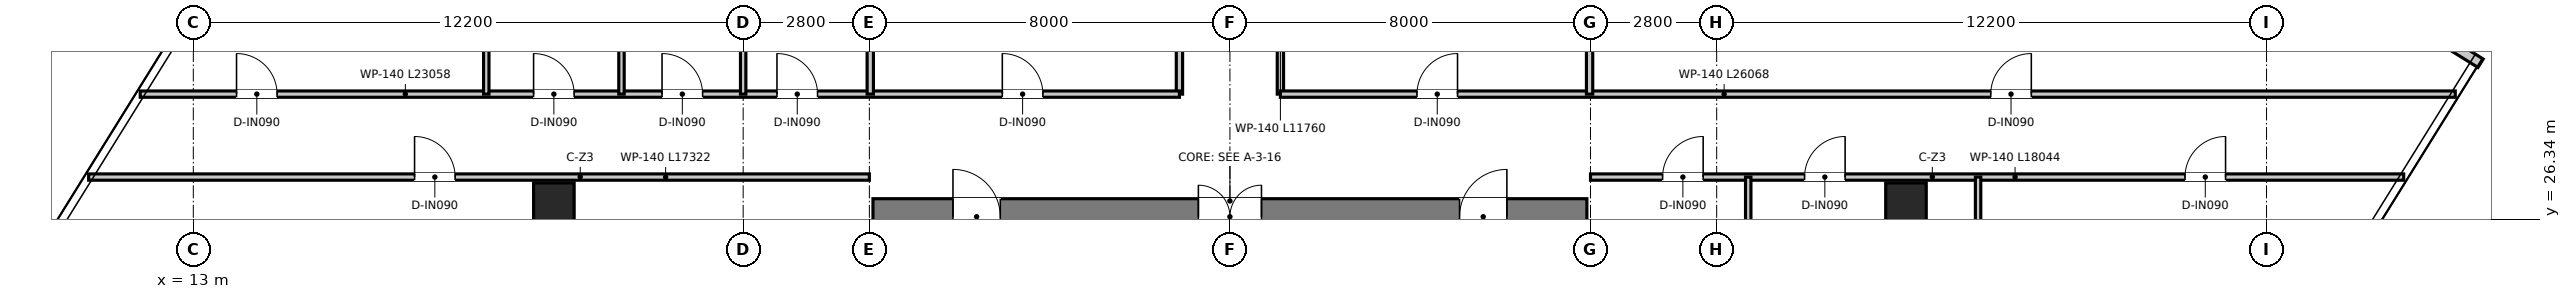
"""IFC4 building model, lengths in metres.
Left out: names, types, materials, properties, quantities, classifications, styles, units other than length and angle.
Written with IfcOpenShell. Run it as: python <this file> out.ifc"""

import sys

from ifc_helpers import new_model, si_unit, direction, frame, frame_2d, origin, origin_2d, place, context, subcontext, project, spatial, rectangle, extrude, source, transform, mapped, element, fill, save


model = new_model("IFC4")
c1 = context("Model", 3, precision=1e-05, world=origin(), true_north=direction((0.0, 1.0)))
c2 = subcontext(c1, "Body", "Model", "MODEL_VIEW")
j1 = project(units=[si_unit("LENGTHUNIT", "METRE"), si_unit("PLANEANGLEUNIT", "RADIAN")], contexts=[c1])
p1 = place(None, origin())
s1 = spatial("IfcSite", under=j1, at=p1, CompositionType="ELEMENT")
p2 = place(p1, origin())
s2 = spatial("IfcBuilding", under=s1, at=p2, CompositionType="ELEMENT")
p3 = place(p2, frame((0.0, 0.0, 173.85)))
s3 = spatial("IfcBuildingStorey", under=s2, at=p3, CompositionType="ELEMENT", Elevation=173.85)
p4 = place(p3, frame((28.08, 26.4, 0.0), z_axis=(0.0, 0.0, 1.0), x_axis=(1.0, 0.0, 0.0)))
e1 = element("IfcWall", 1, at=p4, inside=s3, PredefinedType="SHEAR", context=c2, shape_type="SweptSolid", body=[
    extrude(rectangle(XDim=15.84, YDim=0.8, at=frame_2d((7.92, 0.0))), origin(), (0.0, 0.0, 1.0), 3.95),
])
p5 = place(p4, frame((7.22, 0.0, 0.0)))
e2 = element("IfcOpeningElement", 2, at=p5, cuts=e1, PredefinedType="OPENING", context=c2, shape_type="SweptSolid", body=[
    extrude(rectangle(XDim=1.4, YDim=2.2, at=frame_2d((0.7, 1.1))), frame((0.0, 0.41, 0.0), z_axis=(0.0, -1.0, 0.0), x_axis=(1.0, 0.0, 0.0)), (0.0, 0.0, 1.0), 0.82),
])
p6 = place(p4, frame((1.775, 0.0, 0.0)))
e3 = element("IfcOpeningElement", 3, at=p6, cuts=e1, PredefinedType="OPENING", context=c2, shape_type="SweptSolid", body=[
    extrude(rectangle(XDim=1.05, YDim=2.1, at=frame_2d((0.525, 1.05))), frame((0.0, 0.41, 0.0), z_axis=(0.0, -1.0, 0.0), x_axis=(1.0, 0.0, 0.0)), (0.0, 0.0, 1.0), 0.82),
])
p7 = place(p4, frame((13.015, 0.0, 0.0)))
e4 = element("IfcOpeningElement", 4, at=p7, cuts=e1, PredefinedType="OPENING", context=c2, shape_type="SweptSolid", body=[
    extrude(rectangle(XDim=1.05, YDim=2.1, at=frame_2d((0.525, 1.05))), frame((0.0, 0.41, 0.0), z_axis=(0.0, -1.0, 0.0), x_axis=(1.0, 0.0, 0.0)), (0.0, 0.0, 1.0), 0.82),
])
m1 = source(origin(), c2, "Body", "SweptSolid", [
    extrude(rectangle(XDim=0.9, YDim=0.9, at=origin_2d()), origin(), (0.0, 0.0, 1.0), 3.95),
])
for number, where, z_axis, x_axis in (
    (5, (21.0, 26.7, 0.0), (0.0, 0.0, 1.0), (1.0, 0.0, 0.0)),
    (6, (51.0, 26.7, 0.0), (0.0, 0.0, 1.0), (1.0, 0.0, 0.0)),
):
    element("IfcColumn", number, at=place(p3, frame(where, z_axis=z_axis, x_axis=x_axis)), inside=s3, PredefinedType="COLUMN", context=c2, shape_type="MappedRepresentation", body=[
        mapped(m1, transform((0.0, 0.0, 0.0), x_axis=(1.0, 0.0, 0.0), y_axis=(0.0, 1.0, 0.0), z_axis=(0.0, 0.0, 1.0), scale=1.0)),
    ])
p8 = place(p3, frame((63.749, 29.805, 0.0), z_axis=(0.0, 0.0, 1.0), x_axis=(-0.84921299194, 0.528050465694, 0.0)))
e7 = element("IfcWall", 7, at=p8, inside=s3, PredefinedType="ELEMENTEDWALL", context=c2, shape_type="SweptSolid", body=[
    extrude(rectangle(XDim=4.745, YDim=0.22, at=frame_2d((2.373, 0.0))), origin(), (0.0, 0.0, 1.0), 3.67),
])
p9 = place(p3, frame((34.88, 29.12, 0.0), z_axis=(0.0, 0.0, 1.0), x_axis=(0.0, 1.0, 0.0)))
e8 = element("IfcWall", 8, at=p9, inside=s3, PredefinedType="PARTITIONING", context=c2, shape_type="SweptSolid", body=[
    extrude(rectangle(XDim=11.76, YDim=0.14, at=frame_2d((5.88, 0.0))), origin(), (0.0, 0.0, 1.0), 3.03),
])
p10 = place(p9, frame((3.205, 0.0, 0.0)))
e9 = element("IfcOpeningElement", 9, at=p10, cuts=e8, PredefinedType="OPENING", context=c2, shape_type="SweptSolid", body=[
    extrude(rectangle(XDim=0.95, YDim=2.1, at=frame_2d((0.475, 1.05))), frame((0.0, 0.08, 0.0), z_axis=(0.0, -1.0, 0.0), x_axis=(1.0, 0.0, 0.0)), (0.0, 0.0, 1.0), 0.16),
])
p11 = place(p9, frame((8.02, 0.0, 0.0)))
e10 = element("IfcOpeningElement", 10, at=p11, cuts=e8, PredefinedType="OPENING", context=c2, shape_type="SweptSolid", body=[
    extrude(rectangle(XDim=0.9, YDim=2.1, at=frame_2d((0.45, 1.05))), frame((0.0, 0.08, 0.0), z_axis=(0.0, -1.0, 0.0), x_axis=(1.0, 0.0, 0.0)), (0.0, 0.0, 1.0), 0.16),
])
p12 = place(p3, frame((37.12, 29.12, 0.0), z_axis=(0.0, 0.0, 1.0), x_axis=(0.0, 1.0, 0.0)))
e11 = element("IfcWall", 11, at=p12, inside=s3, PredefinedType="PARTITIONING", context=c2, shape_type="SweptSolid", body=[
    extrude(rectangle(XDim=11.76, YDim=0.14, at=frame_2d((5.88, 0.0))), origin(), (0.0, 0.0, 1.0), 3.03),
])
p13 = place(p12, frame((4.085, 0.0, 0.0)))
e12 = element("IfcOpeningElement", 12, at=p13, cuts=e11, PredefinedType="OPENING", context=c2, shape_type="SweptSolid", body=[
    extrude(rectangle(XDim=0.95, YDim=2.1, at=frame_2d((0.475, 1.05))), frame((0.0, 0.08, 0.0), z_axis=(0.0, -1.0, 0.0), x_axis=(1.0, 0.0, 0.0)), (0.0, 0.0, 1.0), 0.16),
])
p14 = place(p12, frame((6.82, 0.0, 0.0)))
e13 = element("IfcOpeningElement", 13, at=p14, cuts=e11, PredefinedType="OPENING", context=c2, shape_type="SweptSolid", body=[
    extrude(rectangle(XDim=0.9, YDim=2.1, at=frame_2d((0.45, 1.05))), frame((0.0, 0.08, 0.0), z_axis=(0.0, -1.0, 0.0), x_axis=(1.0, 0.0, 0.0)), (0.0, 0.0, 1.0), 0.16),
])
p15 = place(p12, frame((9.83, 0.0, 0.0)))
e14 = element("IfcOpeningElement", 14, at=p15, cuts=e11, PredefinedType="OPENING", context=c2, shape_type="SweptSolid", body=[
    extrude(rectangle(XDim=0.9, YDim=2.1, at=frame_2d((0.45, 1.05))), frame((0.0, 0.08, 0.0), z_axis=(0.0, -1.0, 0.0), x_axis=(1.0, 0.0, 0.0)), (0.0, 0.0, 1.0), 0.16),
])
p16 = place(p3, frame((11.822, 29.12, 0.0), z_axis=(0.0, 0.0, 1.0), x_axis=(1.0, 0.0, 0.0)))
e15 = element("IfcWall", 15, at=p16, inside=s3, PredefinedType="PARTITIONING", context=c2, shape_type="SweptSolid", body=[
    extrude(rectangle(XDim=23.058, YDim=0.14, at=frame_2d((11.529, 0.0))), origin(), (0.0, 0.0, 1.0), 3.03),
])
p17 = place(p16, frame((19.128, 0.0, 0.0)))
e16 = element("IfcOpeningElement", 16, at=p17, cuts=e15, PredefinedType="OPENING", context=c2, shape_type="SweptSolid", body=[
    extrude(rectangle(XDim=0.9, YDim=2.1, at=frame_2d((0.45, 1.05))), frame((0.0, 0.08, 0.0), z_axis=(0.0, -1.0, 0.0), x_axis=(1.0, 0.0, 0.0)), (0.0, 0.0, 1.0), 0.16),
])
p18 = place(p16, frame((2.137, 0.0, 0.0)))
e17 = element("IfcOpeningElement", 17, at=p18, cuts=e15, PredefinedType="OPENING", context=c2, shape_type="SweptSolid", body=[
    extrude(rectangle(XDim=0.9, YDim=2.1, at=frame_2d((0.45, 1.05))), frame((0.0, 0.08, 0.0), z_axis=(0.0, -1.0, 0.0), x_axis=(1.0, 0.0, 0.0)), (0.0, 0.0, 1.0), 0.16),
])
p19 = place(p16, frame((8.728, 0.0, 0.0)))
e18 = element("IfcOpeningElement", 18, at=p19, cuts=e15, PredefinedType="OPENING", context=c2, shape_type="SweptSolid", body=[
    extrude(rectangle(XDim=0.9, YDim=2.1, at=frame_2d((0.45, 1.05))), frame((0.0, 0.08, 0.0), z_axis=(0.0, -1.0, 0.0), x_axis=(1.0, 0.0, 0.0)), (0.0, 0.0, 1.0), 0.16),
])
p20 = place(p16, frame((11.578, 0.0, 0.0)))
e19 = element("IfcOpeningElement", 19, at=p20, cuts=e15, PredefinedType="OPENING", context=c2, shape_type="SweptSolid", body=[
    extrude(rectangle(XDim=0.9, YDim=2.1, at=frame_2d((0.45, 1.05))), frame((0.0, 0.08, 0.0), z_axis=(0.0, -1.0, 0.0), x_axis=(1.0, 0.0, 0.0)), (0.0, 0.0, 1.0), 0.16),
])
p21 = place(p16, frame((14.128, 0.0, 0.0)))
e20 = element("IfcOpeningElement", 20, at=p21, cuts=e15, PredefinedType="OPENING", context=c2, shape_type="SweptSolid", body=[
    extrude(rectangle(XDim=0.9, YDim=2.1, at=frame_2d((0.45, 1.05))), frame((0.0, 0.08, 0.0), z_axis=(0.0, -1.0, 0.0), x_axis=(1.0, 0.0, 0.0)), (0.0, 0.0, 1.0), 0.16),
])
p22 = place(p3, frame((37.12, 29.12, 0.0), z_axis=(0.0, 0.0, 1.0), x_axis=(1.0, 0.0, 0.0)))
e21 = element("IfcWall", 21, at=p22, inside=s3, PredefinedType="PARTITIONING", context=c2, shape_type="SweptSolid", body=[
    extrude(rectangle(XDim=26.068, YDim=0.14, at=frame_2d((13.034, 0.0))), origin(), (0.0, 0.0, 1.0), 3.03),
])
p23 = place(p22, frame((3.03, 0.0, 0.0)))
e22 = element("IfcOpeningElement", 22, at=p23, cuts=e21, PredefinedType="OPENING", context=c2, shape_type="SweptSolid", body=[
    extrude(rectangle(XDim=0.9, YDim=2.1, at=frame_2d((0.45, 1.05))), frame((0.0, 0.08, 0.0), z_axis=(0.0, -1.0, 0.0), x_axis=(1.0, 0.0, 0.0)), (0.0, 0.0, 1.0), 0.16),
])
p24 = place(p22, frame((15.761, 0.0, 0.0)))
e23 = element("IfcOpeningElement", 23, at=p24, cuts=e21, PredefinedType="OPENING", context=c2, shape_type="SweptSolid", body=[
    extrude(rectangle(XDim=0.9, YDim=2.1, at=frame_2d((0.45, 1.05))), frame((0.0, 0.08, 0.0), z_axis=(0.0, -1.0, 0.0), x_axis=(1.0, 0.0, 0.0)), (0.0, 0.0, 1.0), 0.16),
])
p25 = place(p3, frame((10.678, 27.28, 0.0), z_axis=(0.0, 0.0, 1.0), x_axis=(1.0, 0.0, 0.0)))
e24 = element("IfcWall", 24, at=p25, inside=s3, PredefinedType="PARTITIONING", context=c2, shape_type="SweptSolid", body=[
    extrude(rectangle(XDim=17.322, YDim=0.14, at=frame_2d((8.661, 0.0))), origin(), (0.0, 0.0, 1.0), 3.03),
])
p26 = place(p25, frame((7.231, 0.0, 0.0)))
e25 = element("IfcOpeningElement", 25, at=p26, cuts=e24, PredefinedType="OPENING", context=c2, shape_type="SweptSolid", body=[
    extrude(rectangle(XDim=0.9, YDim=2.1, at=frame_2d((0.45, 1.05))), frame((0.0, 0.08, 0.0), z_axis=(0.0, -1.0, 0.0), x_axis=(1.0, 0.0, 0.0)), (0.0, 0.0, 1.0), 0.16),
])
p27 = place(p3, frame((44.0, 27.28, 0.0), z_axis=(0.0, 0.0, 1.0), x_axis=(1.0, 0.0, 0.0)))
e26 = element("IfcWall", 26, at=p27, inside=s3, PredefinedType="PARTITIONING", context=c2, shape_type="SweptSolid", body=[
    extrude(rectangle(XDim=18.044, YDim=0.14, at=frame_2d((9.022, 0.0))), origin(), (0.0, 0.0, 1.0), 3.03),
])
p28 = place(p27, frame((1.6, 0.0, 0.0)))
e27 = element("IfcOpeningElement", 27, at=p28, cuts=e26, PredefinedType="OPENING", context=c2, shape_type="SweptSolid", body=[
    extrude(rectangle(XDim=0.9, YDim=2.1, at=frame_2d((0.45, 1.05))), frame((0.0, 0.08, 0.0), z_axis=(0.0, -1.0, 0.0), x_axis=(1.0, 0.0, 0.0)), (0.0, 0.0, 1.0), 0.16),
])
p29 = place(p27, frame((4.75, 0.0, 0.0)))
e28 = element("IfcOpeningElement", 28, at=p29, cuts=e26, PredefinedType="OPENING", context=c2, shape_type="SweptSolid", body=[
    extrude(rectangle(XDim=0.9, YDim=2.1, at=frame_2d((0.45, 1.05))), frame((0.0, 0.08, 0.0), z_axis=(0.0, -1.0, 0.0), x_axis=(1.0, 0.0, 0.0)), (0.0, 0.0, 1.0), 0.16),
])
p30 = place(p27, frame((13.191, 0.0, 0.0)))
e29 = element("IfcOpeningElement", 29, at=p30, cuts=e26, PredefinedType="OPENING", context=c2, shape_type="SweptSolid", body=[
    extrude(rectangle(XDim=0.9, YDim=2.1, at=frame_2d((0.45, 1.05))), frame((0.0, 0.08, 0.0), z_axis=(0.0, -1.0, 0.0), x_axis=(1.0, 0.0, 0.0)), (0.0, 0.0, 1.0), 0.16),
])
for number, where, z_axis, x_axis in (
    (30, (28.02, 29.12, 0.0), (0.0, 0.0, 1.0), (0.0, 1.0, 0.0)),
    (31, (43.98, 29.12, 0.0), (0.0, 0.0, 1.0), (0.0, 1.0, 0.0)),
):
    element("IfcWall", number, at=place(p3, frame(where, z_axis=z_axis, x_axis=x_axis)), inside=s3, PredefinedType="PARTITIONING", context=c2, shape_type="SweptSolid", body=[
        extrude(rectangle(XDim=5.46, YDim=0.14, at=frame_2d((2.73, 0.0))), origin(), (0.0, 0.0, 1.0), 3.31),
    ])
p31 = place(p3, frame((19.5, 29.12, 0.0), z_axis=(0.0, 0.0, 1.0), x_axis=(0.0, 1.0, 0.0)))
e32 = element("IfcWall", 32, at=p31, inside=s3, PredefinedType="PARTITIONING", context=c2, shape_type="SweptSolid", body=[
    extrude(rectangle(XDim=12.347, YDim=0.12, at=frame_2d((6.174, 0.0))), origin(), (0.0, 0.0, 1.0), 3.67),
])
p32 = place(p3, frame((22.5, 29.12, 0.0), z_axis=(0.0, 0.0, 1.0), x_axis=(0.0, 1.0, 0.0)))
e33 = element("IfcWall", 33, at=p32, inside=s3, PredefinedType="PARTITIONING", context=c2, shape_type="SweptSolid", body=[
    extrude(rectangle(XDim=17.172, YDim=0.12, at=frame_2d((8.586, 0.0))), origin(), (0.0, 0.0, 1.0), 3.08),
])
p33 = place(p3, frame((25.2, 29.12, 0.0), z_axis=(0.0, 0.0, 1.0), x_axis=(0.0, 1.0, 0.0)))
e34 = element("IfcWall", 34, at=p33, inside=s3, PredefinedType="PARTITIONING", context=c2, shape_type="SweptSolid", body=[
    extrude(rectangle(XDim=21.514, YDim=0.12, at=frame_2d((10.757, 0.0))), origin(), (0.0, 0.0, 1.0), 3.03),
])
p34 = place(p3, frame((47.5, 3.892, 0.0), z_axis=(0.0, 0.0, 1.0), x_axis=(0.0, 1.0, 0.0)))
e35 = element("IfcWall", 35, at=p34, inside=s3, PredefinedType="PARTITIONING", context=c2, shape_type="SweptSolid", body=[
    extrude(rectangle(XDim=23.388, YDim=0.12, at=frame_2d((11.694, 0.0))), origin(), (0.0, 0.0, 1.0), 3.08),
])
p35 = place(p3, frame((52.6, 12.094, 0.0), z_axis=(0.0, 0.0, 1.0), x_axis=(0.0, 1.0, 0.0)))
e36 = element("IfcWall", 36, at=p35, inside=s3, PredefinedType="PARTITIONING", context=c2, shape_type="SweptSolid", body=[
    extrude(rectangle(XDim=15.187, YDim=0.12, at=frame_2d((7.593, 0.0))), origin(), (0.0, 0.0, 1.0), 3.67),
])
p36 = place(p5, origin())
e37 = element("IfcDoor", 37, at=p36, inside=s3, OperationType="DOUBLE_DOOR_SINGLE_SWING", PredefinedType="DOOR", context=c2, shape_type="SweptSolid", body=[
    extrude(rectangle(XDim=1.4, YDim=2.2, at=frame_2d((0.7, 1.1))), frame((0.0, 0.025, 0.0), z_axis=(0.0, -1.0, 0.0), x_axis=(1.0, 0.0, 0.0)), (0.0, 0.0, 1.0), 0.05),
])
fill(e2, e37)
p37 = place(p6, origin())
e38 = element("IfcDoor", 38, at=p37, inside=s3, OperationType="SINGLE_SWING_LEFT", PredefinedType="DOOR", context=c2, shape_type="SweptSolid", body=[
    extrude(rectangle(XDim=1.05, YDim=2.1, at=frame_2d((0.525, 1.05))), frame((0.0, 0.025, 0.0), z_axis=(0.0, -1.0, 0.0), x_axis=(1.0, 0.0, 0.0)), (0.0, 0.0, 1.0), 0.05),
])
fill(e3, e38)
p38 = place(p7, origin())
e39 = element("IfcDoor", 39, at=p38, inside=s3, OperationType="SINGLE_SWING_RIGHT", PredefinedType="DOOR", context=c2, shape_type="SweptSolid", body=[
    extrude(rectangle(XDim=1.05, YDim=2.1, at=frame_2d((0.525, 1.05))), frame((0.0, 0.025, 0.0), z_axis=(0.0, -1.0, 0.0), x_axis=(1.0, 0.0, 0.0)), (0.0, 0.0, 1.0), 0.05),
])
fill(e4, e39)
p39 = place(p17, origin())
e40 = element("IfcDoor", 40, at=p39, inside=s3, OperationType="SINGLE_SWING_LEFT", PredefinedType="DOOR", context=c2, shape_type="SweptSolid", body=[
    extrude(rectangle(XDim=0.9, YDim=2.1, at=frame_2d((0.45, 1.05))), frame((0.0, 0.025, 0.0), z_axis=(0.0, -1.0, 0.0), x_axis=(1.0, 0.0, 0.0)), (0.0, 0.0, 1.0), 0.05),
])
fill(e16, e40)
p40 = place(p23, origin())
e41 = element("IfcDoor", 41, at=p40, inside=s3, OperationType="SINGLE_SWING_RIGHT", PredefinedType="DOOR", context=c2, shape_type="SweptSolid", body=[
    extrude(rectangle(XDim=0.9, YDim=2.1, at=frame_2d((0.45, 1.05))), frame((0.0, 0.025, 0.0), z_axis=(0.0, -1.0, 0.0), x_axis=(1.0, 0.0, 0.0)), (0.0, 0.0, 1.0), 0.05),
])
fill(e22, e41)
p41 = place(p18, origin())
e42 = element("IfcDoor", 42, at=p41, inside=s3, OperationType="SINGLE_SWING_LEFT", PredefinedType="DOOR", context=c2, shape_type="SweptSolid", body=[
    extrude(rectangle(XDim=0.9, YDim=2.1, at=frame_2d((0.45, 1.05))), frame((0.0, 0.025, 0.0), z_axis=(0.0, -1.0, 0.0), x_axis=(1.0, 0.0, 0.0)), (0.0, 0.0, 1.0), 0.05),
])
fill(e17, e42)
p42 = place(p19, origin())
e43 = element("IfcDoor", 43, at=p42, inside=s3, OperationType="SINGLE_SWING_LEFT", PredefinedType="DOOR", context=c2, shape_type="SweptSolid", body=[
    extrude(rectangle(XDim=0.9, YDim=2.1, at=frame_2d((0.45, 1.05))), frame((0.0, 0.025, 0.0), z_axis=(0.0, -1.0, 0.0), x_axis=(1.0, 0.0, 0.0)), (0.0, 0.0, 1.0), 0.05),
])
fill(e18, e43)
p43 = place(p20, origin())
e44 = element("IfcDoor", 44, at=p43, inside=s3, OperationType="SINGLE_SWING_LEFT", PredefinedType="DOOR", context=c2, shape_type="SweptSolid", body=[
    extrude(rectangle(XDim=0.9, YDim=2.1, at=frame_2d((0.45, 1.05))), frame((0.0, 0.025, 0.0), z_axis=(0.0, -1.0, 0.0), x_axis=(1.0, 0.0, 0.0)), (0.0, 0.0, 1.0), 0.05),
])
fill(e19, e44)
p44 = place(p21, origin())
e45 = element("IfcDoor", 45, at=p44, inside=s3, OperationType="SINGLE_SWING_LEFT", PredefinedType="DOOR", context=c2, shape_type="SweptSolid", body=[
    extrude(rectangle(XDim=0.9, YDim=2.1, at=frame_2d((0.45, 1.05))), frame((0.0, 0.025, 0.0), z_axis=(0.0, -1.0, 0.0), x_axis=(1.0, 0.0, 0.0)), (0.0, 0.0, 1.0), 0.05),
])
fill(e20, e45)
p45 = place(p24, origin())
e46 = element("IfcDoor", 46, at=p45, inside=s3, OperationType="SINGLE_SWING_RIGHT", PredefinedType="DOOR", context=c2, shape_type="SweptSolid", body=[
    extrude(rectangle(XDim=0.9, YDim=2.1, at=frame_2d((0.45, 1.05))), frame((0.0, 0.025, 0.0), z_axis=(0.0, -1.0, 0.0), x_axis=(1.0, 0.0, 0.0)), (0.0, 0.0, 1.0), 0.05),
])
fill(e23, e46)
p46 = place(p26, origin())
e47 = element("IfcDoor", 47, at=p46, inside=s3, OperationType="SINGLE_SWING_LEFT", PredefinedType="DOOR", context=c2, shape_type="SweptSolid", body=[
    extrude(rectangle(XDim=0.9, YDim=2.1, at=frame_2d((0.45, 1.05))), frame((0.0, 0.025, 0.0), z_axis=(0.0, -1.0, 0.0), x_axis=(1.0, 0.0, 0.0)), (0.0, 0.0, 1.0), 0.05),
])
fill(e25, e47)
p47 = place(p28, origin())
e48 = element("IfcDoor", 48, at=p47, inside=s3, OperationType="SINGLE_SWING_RIGHT", PredefinedType="DOOR", context=c2, shape_type="SweptSolid", body=[
    extrude(rectangle(XDim=0.9, YDim=2.1, at=frame_2d((0.45, 1.05))), frame((0.0, 0.025, 0.0), z_axis=(0.0, -1.0, 0.0), x_axis=(1.0, 0.0, 0.0)), (0.0, 0.0, 1.0), 0.05),
])
fill(e27, e48)
p48 = place(p29, origin())
e49 = element("IfcDoor", 49, at=p48, inside=s3, OperationType="SINGLE_SWING_RIGHT", PredefinedType="DOOR", context=c2, shape_type="SweptSolid", body=[
    extrude(rectangle(XDim=0.9, YDim=2.1, at=frame_2d((0.45, 1.05))), frame((0.0, 0.025, 0.0), z_axis=(0.0, -1.0, 0.0), x_axis=(1.0, 0.0, 0.0)), (0.0, 0.0, 1.0), 0.05),
])
fill(e28, e49)
p49 = place(p30, origin())
e50 = element("IfcDoor", 50, at=p49, inside=s3, OperationType="SINGLE_SWING_RIGHT", PredefinedType="DOOR", context=c2, shape_type="SweptSolid", body=[
    extrude(rectangle(XDim=0.9, YDim=2.1, at=frame_2d((0.45, 1.05))), frame((0.0, 0.025, 0.0), z_axis=(0.0, -1.0, 0.0), x_axis=(1.0, 0.0, 0.0)), (0.0, 0.0, 1.0), 0.05),
])
fill(e29, e50)
save(model, sys.argv[1])
